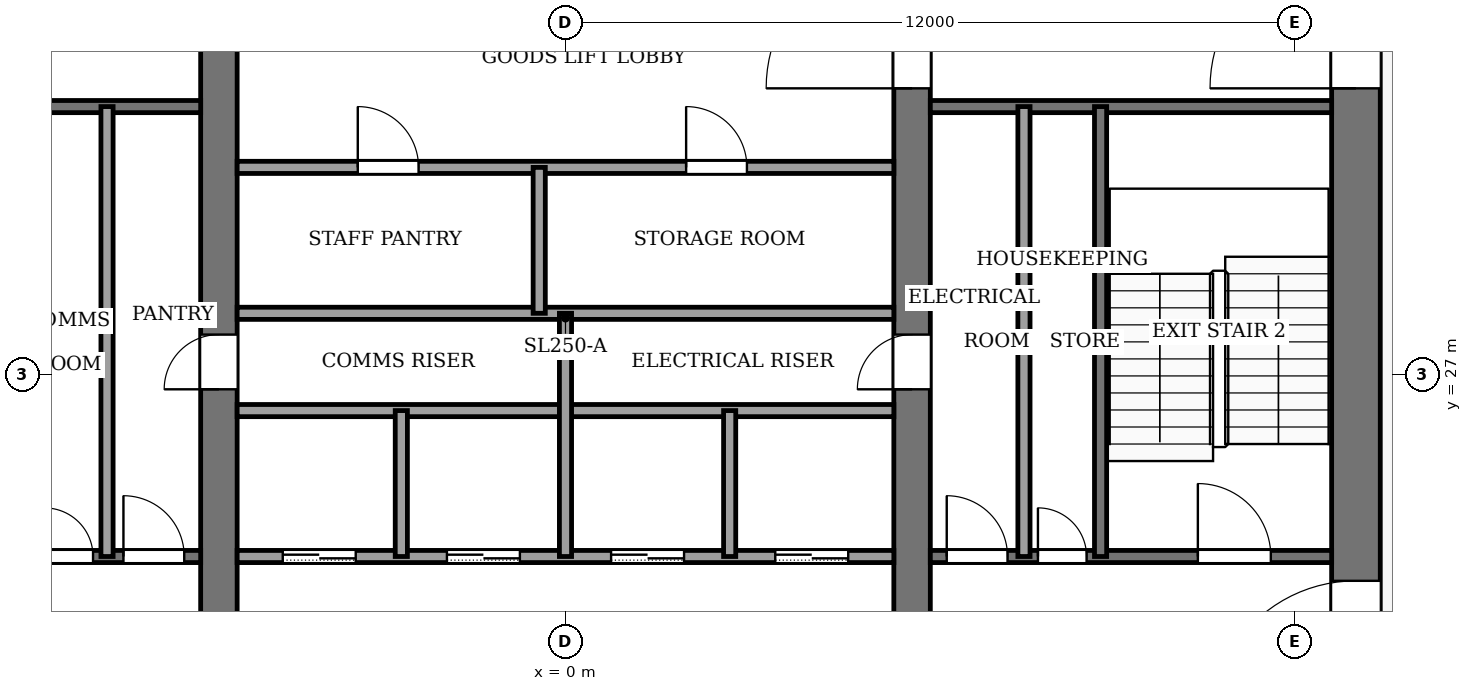
"""IFC4 building model, lengths in metres.
Left out: names, types, materials, properties, quantities, classifications, styles, units other than length and angle.
Written with IfcOpenShell. Run it as: python <this file> out.ifc"""

import sys

from ifc_helpers import new_model, si_unit, direction, frame, frame_2d, origin, place, context, subcontext, project, spatial, rectangle, extrude, element, fill, save


model = new_model("IFC4")
c1 = context("Model", 3, precision=1e-05, world=origin(), true_north=direction((0.0, 1.0)))
c2 = subcontext(c1, "Body", "Model", "MODEL_VIEW")
j1 = project(units=[si_unit("LENGTHUNIT", "METRE"), si_unit("PLANEANGLEUNIT", "RADIAN")], contexts=[c1])
p1 = place(None, origin())
s1 = spatial("IfcSite", under=j1, at=p1, CompositionType="ELEMENT")
p2 = place(p1, origin())
s2 = spatial("IfcBuilding", under=s1, at=p2, CompositionType="ELEMENT")
p3 = place(p2, frame((0.0, 0.0, 278.0)))
s3 = spatial("IfcBuildingStorey", under=s2, at=p3, CompositionType="ELEMENT", Elevation=278.0)
p4 = place(p3, frame((13.0, 18.4, -0.13), z_axis=(0.0, 0.0, 1.0), x_axis=(0.0, 1.0, 0.0)))
e1 = element("IfcWall", 1, at=p4, inside=s3, PredefinedType="SHEAR", context=c2, shape_type="SweptSolid", body=[
    extrude(rectangle(XDim=19.2, YDim=0.8, at=frame_2d((9.6, 0.0))), origin(), (0.0, 0.0, 1.0), 3.88),
])
p5 = place(p4, frame((2.8, 0.0, 0.13)))
e2 = element("IfcOpeningElement", 2, at=p5, cuts=e1, PredefinedType="OPENING", context=c2, shape_type="SweptSolid", body=[
    extrude(rectangle(XDim=2.4, YDim=2.4, at=frame_2d((1.2, 1.2))), frame((0.0, 0.41, 0.0), z_axis=(0.0, -1.0, 0.0), x_axis=(1.0, 0.0, 0.0)), (0.0, 0.0, 1.0), 0.82),
])
p6 = place(p4, frame((13.3, 0.0, 0.13)))
e3 = element("IfcOpeningElement", 3, at=p6, cuts=e1, PredefinedType="OPENING", context=c2, shape_type="SweptSolid", body=[
    extrude(rectangle(XDim=2.4, YDim=2.4, at=frame_2d((1.2, 1.2))), frame((0.0, 0.41, 0.0), z_axis=(0.0, -1.0, 0.0), x_axis=(1.0, 0.0, 0.0)), (0.0, 0.0, 1.0), 0.82),
])
p7 = place(p3, frame((-5.7, 18.4, -0.13), z_axis=(0.0, 0.0, 1.0), x_axis=(0.0, 1.0, 0.0)))
e4 = element("IfcWall", 4, at=p7, inside=s3, PredefinedType="SHEAR", context=c2, shape_type="SweptSolid", body=[
    extrude(rectangle(XDim=19.2, YDim=0.6, at=frame_2d((9.6, 0.0))), origin(), (0.0, 0.0, 1.0), 3.88),
])
p8 = place(p7, frame((8.35, 0.0, 0.13)))
e5 = element("IfcOpeningElement", 5, at=p8, cuts=e4, PredefinedType="OPENING", context=c2, shape_type="SweptSolid", body=[
    extrude(rectangle(XDim=0.9, YDim=2.1, at=frame_2d((0.45, 1.05))), frame((0.0, 0.31, 0.0), z_axis=(0.0, -1.0, 0.0), x_axis=(1.0, 0.0, 0.0)), (0.0, 0.0, 1.0), 0.62),
])
p9 = place(p3, frame((5.7, 18.4, -0.13), z_axis=(0.0, 0.0, 1.0), x_axis=(0.0, 1.0, 0.0)))
e6 = element("IfcWall", 6, at=p9, inside=s3, PredefinedType="SHEAR", context=c2, shape_type="SweptSolid", body=[
    extrude(rectangle(XDim=19.2, YDim=0.6, at=frame_2d((9.6, 0.0))), origin(), (0.0, 0.0, 1.0), 3.88),
])
p10 = place(p9, frame((8.35, 0.0, 0.13)))
e7 = element("IfcOpeningElement", 7, at=p10, cuts=e6, PredefinedType="OPENING", context=c2, shape_type="SweptSolid", body=[
    extrude(rectangle(XDim=0.9, YDim=2.1, at=frame_2d((0.45, 1.05))), frame((0.0, 0.31, 0.0), z_axis=(0.0, -1.0, 0.0), x_axis=(1.0, 0.0, 0.0)), (0.0, 0.0, 1.0), 0.62),
])
p11 = place(p9, frame((13.3, 0.0, 0.13)))
e8 = element("IfcOpeningElement", 8, at=p11, cuts=e6, PredefinedType="OPENING", context=c2, shape_type="SweptSolid", body=[
    extrude(rectangle(XDim=2.4, YDim=2.4, at=frame_2d((1.2, 1.2))), frame((0.0, 0.31, 0.0), z_axis=(0.0, -1.0, 0.0), x_axis=(1.0, 0.0, 0.0)), (0.0, 0.0, 1.0), 0.62),
])
p12 = place(p3, frame((-12.6, 24.0, 0.0), z_axis=(0.0, 0.0, 1.0), x_axis=(1.0, 0.0, 0.0)))
e9 = element("IfcWall", 9, at=p12, inside=s3, PredefinedType="PARTITIONING", context=c2, shape_type="SweptSolid", body=[
    extrude(rectangle(XDim=6.6, YDim=0.2, at=frame_2d((3.3, 0.0))), origin(), (0.0, 0.0, 1.0), 3.75),
])
p13 = place(p12, frame((4.03, 0.0, 0.0)))
e10 = element("IfcOpeningElement", 10, at=p13, cuts=e9, PredefinedType="OPENING", context=c2, shape_type="SweptSolid", body=[
    extrude(rectangle(XDim=0.8, YDim=2.1, at=frame_2d((0.4, 1.05))), frame((0.0, 0.11, 0.0), z_axis=(0.0, -1.0, 0.0), x_axis=(1.0, 0.0, 0.0)), (0.0, 0.0, 1.0), 0.22),
])
p14 = place(p12, frame((5.33, 0.0, 0.0)))
e11 = element("IfcOpeningElement", 11, at=p14, cuts=e9, PredefinedType="OPENING", context=c2, shape_type="SweptSolid", body=[
    extrude(rectangle(XDim=1.0, YDim=2.1, at=frame_2d((0.5, 1.05))), frame((0.0, 0.11, 0.0), z_axis=(0.0, -1.0, 0.0), x_axis=(1.0, 0.0, 0.0)), (0.0, 0.0, 1.0), 0.22),
])
p15 = place(p3, frame((-5.4, 24.0, 0.0), z_axis=(0.0, 0.0, 1.0), x_axis=(1.0, 0.0, 0.0)))
e12 = element("IfcWall", 12, at=p15, inside=s3, PredefinedType="PARTITIONING", context=c2, shape_type="SweptSolid", body=[
    extrude(rectangle(XDim=10.8, YDim=0.2, at=frame_2d((5.4, 0.0))), origin(), (0.0, 0.0, 1.0), 3.75),
])
p16 = place(p15, frame((0.75, 0.0, 0.0)))
e13 = element("IfcOpeningElement", 13, at=p16, cuts=e12, PredefinedType="OPENING", context=c2, shape_type="SweptSolid", body=[
    extrude(rectangle(XDim=1.2, YDim=2.2, at=frame_2d((0.6, 1.1))), frame((0.0, 0.11, 0.0), z_axis=(0.0, -1.0, 0.0), x_axis=(1.0, 0.0, 0.0)), (0.0, 0.0, 1.0), 0.22),
])
p17 = place(p15, frame((3.45, 0.0, 0.0)))
e14 = element("IfcOpeningElement", 14, at=p17, cuts=e12, PredefinedType="OPENING", context=c2, shape_type="SweptSolid", body=[
    extrude(rectangle(XDim=1.2, YDim=2.2, at=frame_2d((0.6, 1.1))), frame((0.0, 0.11, 0.0), z_axis=(0.0, -1.0, 0.0), x_axis=(1.0, 0.0, 0.0)), (0.0, 0.0, 1.0), 0.22),
])
p18 = place(p15, frame((6.15, 0.0, 0.0)))
e15 = element("IfcOpeningElement", 15, at=p18, cuts=e12, PredefinedType="OPENING", context=c2, shape_type="SweptSolid", body=[
    extrude(rectangle(XDim=1.2, YDim=2.2, at=frame_2d((0.6, 1.1))), frame((0.0, 0.11, 0.0), z_axis=(0.0, -1.0, 0.0), x_axis=(1.0, 0.0, 0.0)), (0.0, 0.0, 1.0), 0.22),
])
p19 = place(p15, frame((8.85, 0.0, 0.0)))
e16 = element("IfcOpeningElement", 16, at=p19, cuts=e12, PredefinedType="OPENING", context=c2, shape_type="SweptSolid", body=[
    extrude(rectangle(XDim=1.2, YDim=2.2, at=frame_2d((0.6, 1.1))), frame((0.0, 0.11, 0.0), z_axis=(0.0, -1.0, 0.0), x_axis=(1.0, 0.0, 0.0)), (0.0, 0.0, 1.0), 0.22),
])
p20 = place(p3, frame((6.0, 24.0, 0.0), z_axis=(0.0, 0.0, 1.0), x_axis=(1.0, 0.0, 0.0)))
e17 = element("IfcWall", 17, at=p20, inside=s3, PredefinedType="PARTITIONING", context=c2, shape_type="SweptSolid", body=[
    extrude(rectangle(XDim=6.6, YDim=0.2, at=frame_2d((3.3, 0.0))), origin(), (0.0, 0.0, 1.0), 3.75),
])
p21 = place(p20, frame((0.27, 0.0, 0.0)))
e18 = element("IfcOpeningElement", 18, at=p21, cuts=e17, PredefinedType="OPENING", context=c2, shape_type="SweptSolid", body=[
    extrude(rectangle(XDim=1.0, YDim=2.1, at=frame_2d((0.5, 1.05))), frame((0.0, 0.11, 0.0), z_axis=(0.0, -1.0, 0.0), x_axis=(1.0, 0.0, 0.0)), (0.0, 0.0, 1.0), 0.22),
])
p22 = place(p20, frame((1.77, 0.0, 0.0)))
e19 = element("IfcOpeningElement", 19, at=p22, cuts=e17, PredefinedType="OPENING", context=c2, shape_type="SweptSolid", body=[
    extrude(rectangle(XDim=0.8, YDim=2.1, at=frame_2d((0.4, 1.05))), frame((0.0, 0.11, 0.0), z_axis=(0.0, -1.0, 0.0), x_axis=(1.0, 0.0, 0.0)), (0.0, 0.0, 1.0), 0.22),
])
p23 = place(p20, frame((4.4, 0.0, 0.0)))
e20 = element("IfcOpeningElement", 20, at=p23, cuts=e17, PredefinedType="OPENING", context=c2, shape_type="SweptSolid", body=[
    extrude(rectangle(XDim=1.2, YDim=2.2, at=frame_2d((0.6, 1.1))), frame((0.0, 0.11, 0.0), z_axis=(0.0, -1.0, 0.0), x_axis=(1.0, 0.0, 0.0)), (0.0, 0.0, 1.0), 0.22),
])
for number, where, z_axis, x_axis in (
    (21, (-5.4, 26.4, 0.0), (0.0, 0.0, 1.0), (1.0, 0.0, 0.0)),
    (22, (-5.4, 28.0, 0.0), (0.0, 0.0, 1.0), (1.0, 0.0, 0.0)),
):
    element("IfcWall", number, at=place(p3, frame(where, z_axis=z_axis, x_axis=x_axis)), inside=s3, PredefinedType="PARTITIONING", context=c2, shape_type="SweptSolid", body=[
        extrude(rectangle(XDim=10.8, YDim=0.2, at=frame_2d((5.4, 0.0))), origin(), (0.0, 0.0, 1.0), 3.75),
    ])
p24 = place(p3, frame((-5.4, 30.4, 0.0), z_axis=(0.0, 0.0, 1.0), x_axis=(1.0, 0.0, 0.0)))
e23 = element("IfcWall", 23, at=p24, inside=s3, PredefinedType="PARTITIONING", context=c2, shape_type="SweptSolid", body=[
    extrude(rectangle(XDim=10.8, YDim=0.2, at=frame_2d((5.4, 0.0))), origin(), (0.0, 0.0, 1.0), 3.75),
])
p25 = place(p24, frame((1.984, 0.0, 0.0)))
e24 = element("IfcOpeningElement", 24, at=p25, cuts=e23, PredefinedType="OPENING", context=c2, shape_type="SweptSolid", body=[
    extrude(rectangle(XDim=1.0, YDim=2.1, at=frame_2d((0.5, 1.05))), frame((0.0, 0.11, 0.0), z_axis=(0.0, -1.0, 0.0), x_axis=(1.0, 0.0, 0.0)), (0.0, 0.0, 1.0), 0.22),
])
p26 = place(p24, frame((7.384, 0.0, 0.0)))
e25 = element("IfcOpeningElement", 25, at=p26, cuts=e23, PredefinedType="OPENING", context=c2, shape_type="SweptSolid", body=[
    extrude(rectangle(XDim=1.0, YDim=2.1, at=frame_2d((0.5, 1.05))), frame((0.0, 0.11, 0.0), z_axis=(0.0, -1.0, 0.0), x_axis=(1.0, 0.0, 0.0)), (0.0, 0.0, 1.0), 0.22),
])
p27 = place(p3, frame((-12.6, 31.4, 0.0), z_axis=(0.0, 0.0, 1.0), x_axis=(1.0, 0.0, 0.0)))
e26 = element("IfcWall", 26, at=p27, inside=s3, PredefinedType="PARTITIONING", context=c2, shape_type="SweptSolid", body=[
    extrude(rectangle(XDim=6.6, YDim=0.2, at=frame_2d((3.3, 0.0))), origin(), (0.0, 0.0, 1.0), 3.75),
])
p28 = place(p27, frame((1.0, 0.0, 0.0)))
e27 = element("IfcOpeningElement", 27, at=p28, cuts=e26, PredefinedType="OPENING", context=c2, shape_type="SweptSolid", body=[
    extrude(rectangle(XDim=1.2, YDim=2.2, at=frame_2d((0.6, 1.1))), frame((0.0, 0.11, 0.0), z_axis=(0.0, -1.0, 0.0), x_axis=(1.0, 0.0, 0.0)), (0.0, 0.0, 1.0), 0.22),
])
p29 = place(p3, frame((6.0, 31.4, 0.0), z_axis=(0.0, 0.0, 1.0), x_axis=(1.0, 0.0, 0.0)))
e28 = element("IfcWall", 28, at=p29, inside=s3, PredefinedType="PARTITIONING", context=c2, shape_type="SweptSolid", body=[
    extrude(rectangle(XDim=6.6, YDim=0.2, at=frame_2d((3.3, 0.0))), origin(), (0.0, 0.0, 1.0), 3.75),
])
p30 = place(p3, frame((-7.54, 24.0, 0.0), z_axis=(0.0, 0.0, 1.0), x_axis=(0.0, 1.0, 0.0)))
e29 = element("IfcWall", 29, at=p30, inside=s3, PredefinedType="PARTITIONING", context=c2, shape_type="SweptSolid", body=[
    extrude(rectangle(XDim=7.4, YDim=0.2, at=frame_2d((3.7, 0.0))), origin(), (0.0, 0.0, 1.0), 3.75),
])
for number, where, z_axis, x_axis in (
    (30, (-2.7, 24.0, 0.0), (0.0, 0.0, 1.0), (0.0, 1.0, 0.0)),
    (31, (-0.432, 28.0, 0.0), (0.0, 0.0, 1.0), (0.0, 1.0, 0.0)),
):
    element("IfcWall", number, at=place(p3, frame(where, z_axis=z_axis, x_axis=x_axis)), inside=s3, PredefinedType="PARTITIONING", context=c2, shape_type="SweptSolid", body=[
        extrude(rectangle(XDim=2.4, YDim=0.2, at=frame_2d((1.2, 0.0))), origin(), (0.0, 0.0, 1.0), 3.75),
    ])
p31 = place(p3, frame((0.0, 24.0, 0.0), z_axis=(0.0, 0.0, 1.0), x_axis=(0.0, 1.0, 0.0)))
e32 = element("IfcWall", 32, at=p31, inside=s3, PredefinedType="PARTITIONING", context=c2, shape_type="SweptSolid", body=[
    extrude(rectangle(XDim=4.0, YDim=0.2, at=frame_2d((2.0, 0.0))), origin(), (0.0, 0.0, 1.0), 3.75),
])
p32 = place(p3, frame((2.7, 24.0, 0.0), z_axis=(0.0, 0.0, 1.0), x_axis=(0.0, 1.0, 0.0)))
e33 = element("IfcWall", 33, at=p32, inside=s3, PredefinedType="PARTITIONING", context=c2, shape_type="SweptSolid", body=[
    extrude(rectangle(XDim=2.4, YDim=0.2, at=frame_2d((1.2, 0.0))), origin(), (0.0, 0.0, 1.0), 3.75),
])
for number, where, z_axis, x_axis in (
    (34, (7.54, 24.0, 0.0), (0.0, 0.0, 1.0), (0.0, 1.0, 0.0)),
    (35, (8.8, 24.0, 0.0), (0.0, 0.0, 1.0), (0.0, 1.0, 0.0)),
):
    element("IfcWall", number, at=place(p3, frame(where, z_axis=z_axis, x_axis=x_axis)), inside=s3, PredefinedType="PARTITIONING", context=c2, shape_type="SweptSolid", body=[
        extrude(rectangle(XDim=7.4, YDim=0.2, at=frame_2d((3.7, 0.0))), origin(), (0.0, 0.0, 1.0), 3.75),
    ])
p33 = place(p16, origin())
e36 = element("IfcDoor", 36, at=p33, inside=s3, OperationType="SLIDING_TO_LEFT", PredefinedType="DOOR", context=c2, shape_type="SweptSolid", body=[
    extrude(rectangle(XDim=1.2, YDim=2.2, at=frame_2d((0.6, 1.1))), frame((0.0, 0.025, 0.0), z_axis=(0.0, -1.0, 0.0), x_axis=(1.0, 0.0, 0.0)), (0.0, 0.0, 1.0), 0.05),
])
fill(e13, e36)
p34 = place(p17, origin())
e37 = element("IfcDoor", 37, at=p34, inside=s3, OperationType="SLIDING_TO_LEFT", PredefinedType="DOOR", context=c2, shape_type="SweptSolid", body=[
    extrude(rectangle(XDim=1.2, YDim=2.2, at=frame_2d((0.6, 1.1))), frame((0.0, 0.025, 0.0), z_axis=(0.0, -1.0, 0.0), x_axis=(1.0, 0.0, 0.0)), (0.0, 0.0, 1.0), 0.05),
])
fill(e14, e37)
p35 = place(p18, origin())
e38 = element("IfcDoor", 38, at=p35, inside=s3, OperationType="SLIDING_TO_LEFT", PredefinedType="DOOR", context=c2, shape_type="SweptSolid", body=[
    extrude(rectangle(XDim=1.2, YDim=2.2, at=frame_2d((0.6, 1.1))), frame((0.0, 0.025, 0.0), z_axis=(0.0, -1.0, 0.0), x_axis=(1.0, 0.0, 0.0)), (0.0, 0.0, 1.0), 0.05),
])
fill(e15, e38)
p36 = place(p19, origin())
e39 = element("IfcDoor", 39, at=p36, inside=s3, OperationType="SLIDING_TO_LEFT", PredefinedType="DOOR", context=c2, shape_type="SweptSolid", body=[
    extrude(rectangle(XDim=1.2, YDim=2.2, at=frame_2d((0.6, 1.1))), frame((0.0, 0.025, 0.0), z_axis=(0.0, -1.0, 0.0), x_axis=(1.0, 0.0, 0.0)), (0.0, 0.0, 1.0), 0.05),
])
fill(e16, e39)
p37 = place(p25, origin())
e40 = element("IfcDoor", 40, at=p37, inside=s3, OperationType="SINGLE_SWING_LEFT", PredefinedType="DOOR", context=c2, shape_type="SweptSolid", body=[
    extrude(rectangle(XDim=1.0, YDim=2.1, at=frame_2d((0.5, 1.05))), frame((0.0, 0.025, 0.0), z_axis=(0.0, -1.0, 0.0), x_axis=(1.0, 0.0, 0.0)), (0.0, 0.0, 1.0), 0.05),
])
fill(e24, e40)
p38 = place(p26, origin())
e41 = element("IfcDoor", 41, at=p38, inside=s3, OperationType="SINGLE_SWING_RIGHT", PredefinedType="DOOR", context=c2, shape_type="SweptSolid", body=[
    extrude(rectangle(XDim=1.0, YDim=2.1, at=frame_2d((0.5, 1.05))), frame((0.0, 0.025, 0.0), z_axis=(0.0, -1.0, 0.0), x_axis=(1.0, 0.0, 0.0)), (0.0, 0.0, 1.0), 0.05),
])
fill(e25, e41)
p39 = place(p13, origin())
e42 = element("IfcDoor", 42, at=p39, inside=s3, OperationType="SINGLE_SWING_RIGHT", PredefinedType="DOOR", context=c2, shape_type="SweptSolid", body=[
    extrude(rectangle(XDim=0.8, YDim=2.1, at=frame_2d((0.4, 1.05))), frame((0.0, 0.025, 0.0), z_axis=(0.0, -1.0, 0.0), x_axis=(1.0, 0.0, 0.0)), (0.0, 0.0, 1.0), 0.05),
])
fill(e10, e42)
p40 = place(p14, origin())
e43 = element("IfcDoor", 43, at=p40, inside=s3, OperationType="SINGLE_SWING_LEFT", PredefinedType="DOOR", context=c2, shape_type="SweptSolid", body=[
    extrude(rectangle(XDim=1.0, YDim=2.1, at=frame_2d((0.5, 1.05))), frame((0.0, 0.025, 0.0), z_axis=(0.0, -1.0, 0.0), x_axis=(1.0, 0.0, 0.0)), (0.0, 0.0, 1.0), 0.05),
])
fill(e11, e43)
p41 = place(p21, origin())
e44 = element("IfcDoor", 44, at=p41, inside=s3, OperationType="SINGLE_SWING_RIGHT", PredefinedType="DOOR", context=c2, shape_type="SweptSolid", body=[
    extrude(rectangle(XDim=1.0, YDim=2.1, at=frame_2d((0.5, 1.05))), frame((0.0, 0.025, 0.0), z_axis=(0.0, -1.0, 0.0), x_axis=(1.0, 0.0, 0.0)), (0.0, 0.0, 1.0), 0.05),
])
fill(e18, e44)
p42 = place(p22, origin())
e45 = element("IfcDoor", 45, at=p42, inside=s3, OperationType="SINGLE_SWING_LEFT", PredefinedType="DOOR", context=c2, shape_type="SweptSolid", body=[
    extrude(rectangle(XDim=0.8, YDim=2.1, at=frame_2d((0.4, 1.05))), frame((0.0, 0.025, 0.0), z_axis=(0.0, -1.0, 0.0), x_axis=(1.0, 0.0, 0.0)), (0.0, 0.0, 1.0), 0.05),
])
fill(e19, e45)
p43 = place(p8, origin())
e46 = element("IfcDoor", 46, at=p43, inside=s3, OperationType="SINGLE_SWING_RIGHT", PredefinedType="DOOR", context=c2, shape_type="SweptSolid", body=[
    extrude(rectangle(XDim=0.9, YDim=2.1, at=frame_2d((0.45, 1.05))), frame((0.0, 0.025, 0.0), z_axis=(0.0, -1.0, 0.0), x_axis=(1.0, 0.0, 0.0)), (0.0, 0.0, 1.0), 0.05),
])
fill(e5, e46)
p44 = place(p10, origin())
e47 = element("IfcDoor", 47, at=p44, inside=s3, OperationType="SINGLE_SWING_LEFT", PredefinedType="DOOR", context=c2, shape_type="SweptSolid", body=[
    extrude(rectangle(XDim=0.9, YDim=2.1, at=frame_2d((0.45, 1.05))), frame((0.0, 0.025, 0.0), z_axis=(0.0, -1.0, 0.0), x_axis=(1.0, 0.0, 0.0)), (0.0, 0.0, 1.0), 0.05),
])
fill(e7, e47)
p45 = place(p23, origin())
e48 = element("IfcDoor", 48, at=p45, inside=s3, OperationType="SINGLE_SWING_RIGHT", PredefinedType="DOOR", context=c2, shape_type="SweptSolid", body=[
    extrude(rectangle(XDim=1.2, YDim=2.2, at=frame_2d((0.6, 1.1))), frame((0.0, 0.025, 0.0), z_axis=(0.0, -1.0, 0.0), x_axis=(1.0, 0.0, 0.0)), (0.0, 0.0, 1.0), 0.05),
])
fill(e20, e48)
p46 = place(p11, origin())
e49 = element("IfcDoor", 49, at=p46, inside=s3, OperationType="DOUBLE_DOOR_SINGLE_SWING", PredefinedType="DOOR", context=c2, shape_type="SweptSolid", body=[
    extrude(rectangle(XDim=2.4, YDim=2.4, at=frame_2d((1.2, 1.2))), frame((0.0, 0.025, 0.0), z_axis=(0.0, -1.0, 0.0), x_axis=(1.0, 0.0, 0.0)), (0.0, 0.0, 1.0), 0.05),
])
fill(e8, e49)
p47 = place(p5, origin())
e50 = element("IfcDoor", 50, at=p47, inside=s3, OperationType="DOUBLE_DOOR_SINGLE_SWING", PredefinedType="DOOR", context=c2, shape_type="SweptSolid", body=[
    extrude(rectangle(XDim=2.4, YDim=2.4, at=frame_2d((1.2, 1.2))), frame((0.0, 0.025, 0.0), z_axis=(0.0, -1.0, 0.0), x_axis=(1.0, 0.0, 0.0)), (0.0, 0.0, 1.0), 0.05),
])
fill(e2, e50)
p48 = place(p6, origin())
e51 = element("IfcDoor", 51, at=p48, inside=s3, OperationType="DOUBLE_DOOR_SINGLE_SWING", PredefinedType="DOOR", context=c2, shape_type="SweptSolid", body=[
    extrude(rectangle(XDim=2.4, YDim=2.4, at=frame_2d((1.2, 1.2))), frame((0.0, 0.025, 0.0), z_axis=(0.0, -1.0, 0.0), x_axis=(1.0, 0.0, 0.0)), (0.0, 0.0, 1.0), 0.05),
])
fill(e3, e51)
save(model, sys.argv[1])
